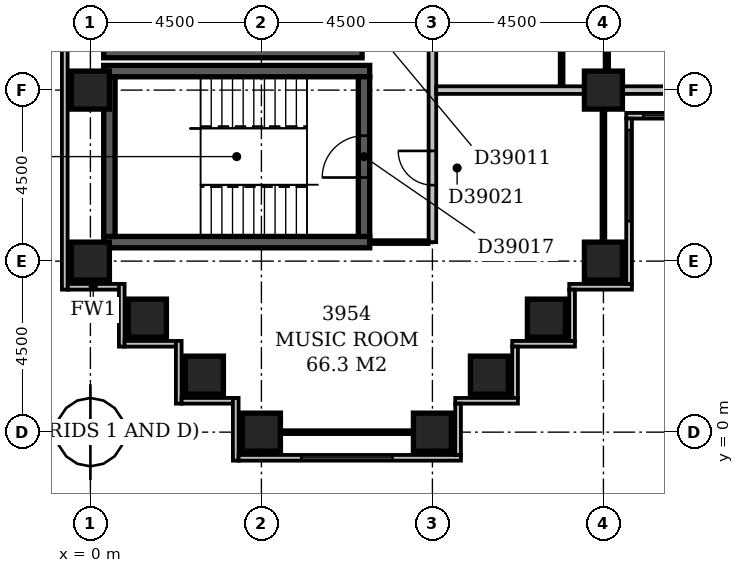
"""IFC4 building model, lengths in metres.
Left out: names, types, materials, properties, quantities, classifications, styles, units other than length and angle.
Written with IfcOpenShell. Run it as: python <this file> out.ifc"""

import sys

from ifc_helpers import new_model, si_unit, direction, frame, frame_2d, origin, origin_2d, place, context, subcontext, project, spatial, rectangle, extrude, element, fill, save


model = new_model("IFC4")
c1 = context("Model", 3, precision=1e-05, world=origin(), true_north=direction((0.0, 1.0)))
c2 = subcontext(c1, "Body", "Model", "MODEL_VIEW")
j1 = project(units=[si_unit("LENGTHUNIT", "METRE"), si_unit("PLANEANGLEUNIT", "RADIAN")], contexts=[c1])
p1 = place(None, origin())
s1 = spatial("IfcSite", under=j1, at=p1, CompositionType="ELEMENT")
p2 = place(p1, origin())
s2 = spatial("IfcBuilding", under=s1, at=p2, CompositionType="ELEMENT")
p3 = place(p2, frame((0.0, 0.0, 155.6)))
s3 = spatial("IfcBuildingStorey", under=s2, at=p3, CompositionType="ELEMENT", Elevation=155.6)
for number, where, z_axis, x_axis in (
    (1, (0.35, 5.0, -0.3), (0.0, 0.0, 1.0), (1.0, 0.0, 0.0)),
    (2, (0.35, 9.5, -0.3), (0.0, 0.0, 1.0), (1.0, 0.0, 0.0)),
):
    element("IfcWall", number, at=place(p3, frame(where, z_axis=z_axis, x_axis=x_axis)), inside=s3, PredefinedType="SHEAR", context=c2, shape_type="SweptSolid", body=[
        extrude(rectangle(XDim=7.0, YDim=0.3, at=frame_2d((3.5, 0.0))), origin(), (0.0, 0.0, 1.0), 3.6),
    ])
p4 = place(p3, frame((0.35, 10.0, -0.3), z_axis=(0.0, 0.0, 1.0), x_axis=(1.0, 0.0, 0.0)))
e3 = element("IfcWall", 3, at=p4, inside=s3, PredefinedType="SHEAR", context=c2, shape_type="SweptSolid", body=[
    extrude(rectangle(XDim=6.8, YDim=0.3, at=frame_2d((3.4, 0.0))), origin(), (0.0, 0.0, 1.0), 3.6),
])
p5 = place(p3, frame((0.5, 5.15, -0.3), z_axis=(0.0, 0.0, 1.0), x_axis=(0.0, 1.0, 0.0)))
e4 = element("IfcWall", 4, at=p5, inside=s3, PredefinedType="SHEAR", context=c2, shape_type="SweptSolid", body=[
    extrude(rectangle(XDim=4.2, YDim=0.3, at=frame_2d((2.1, 0.0))), origin(), (0.0, 0.0, 1.0), 3.6),
])
p6 = place(p3, frame((7.2, 5.15, -0.3), z_axis=(0.0, 0.0, 1.0), x_axis=(0.0, 1.0, 0.0)))
e5 = element("IfcWall", 5, at=p6, inside=s3, PredefinedType="SHEAR", context=c2, shape_type="SweptSolid", body=[
    extrude(rectangle(XDim=4.2, YDim=0.3, at=frame_2d((2.1, 0.0))), origin(), (0.0, 0.0, 1.0), 3.6),
])
p7 = place(p6, frame((1.55, 0.0, 0.3)))
e6 = element("IfcOpeningElement", 6, at=p7, cuts=e5, PredefinedType="OPENING", context=c2, shape_type="SweptSolid", body=[
    extrude(rectangle(XDim=1.1, YDim=2.1, at=frame_2d((0.55, 1.05))), frame((0.0, 0.162, 0.0), z_axis=(0.0, -1.0, 0.0), x_axis=(1.0, 0.0, 0.0)), (0.0, 0.0, 1.0), 0.324),
])
for number, where, z_axis, x_axis in (
    (7, (4.5, 0.0, -0.3), (0.0, 0.0, 1.0), (1.0, 0.0, 0.0)),
    (8, (9.0, 0.0, -0.3), (0.0, 0.0, 1.0), (1.0, 0.0, 0.0)),
    (9, (3.0, 1.5, -0.3), (0.0, 0.0, 1.0), (1.0, 0.0, 0.0)),
    (10, (10.5, 1.5, -0.3), (0.0, 0.0, 1.0), (1.0, 0.0, 0.0)),
    (11, (1.5, 3.0, -0.3), (0.0, 0.0, 1.0), (1.0, 0.0, 0.0)),
    (12, (12.0, 3.0, -0.3), (0.0, 0.0, 1.0), (1.0, 0.0, 0.0)),
    (13, (0.0, 4.5, -0.3), (0.0, 0.0, 1.0), (1.0, 0.0, 0.0)),
    (14, (13.5, 4.5, -0.3), (0.0, 0.0, 1.0), (1.0, 0.0, 0.0)),
    (15, (0.0, 9.0, -0.3), (0.0, 0.0, 1.0), (1.0, 0.0, 0.0)),
    (16, (13.5, 9.0, -0.3), (0.0, 0.0, 1.0), (1.0, 0.0, 0.0)),
):
    element("IfcColumn", number, at=place(p3, frame(where, z_axis=z_axis, x_axis=x_axis)), inside=s3, PredefinedType="COLUMN", context=c2, shape_type="SweptSolid", body=[
        extrude(rectangle(XDim=1.0, YDim=1.0, at=origin_2d()), origin(), (0.0, 0.0, 1.0), 3.6),
    ])
p8 = place(p3, frame((9.675, -0.6, 0.0), z_axis=(0.0, 0.0, 1.0), x_axis=(0.0, 1.0, 0.0)))
e17 = element("IfcWall", 17, at=p8, inside=s3, PredefinedType="STANDARD", context=c2, shape_type="SweptSolid", body=[
    extrude(rectangle(XDim=1.35, YDim=0.15, at=frame_2d((0.675, 0.0))), origin(), (0.0, 0.0, 1.0), 2.7),
])
p9 = place(p3, frame((9.6, 0.825, 0.0), z_axis=(0.0, 0.0, 1.0), x_axis=(1.0, 0.0, 0.0)))
e18 = element("IfcWall", 18, at=p9, inside=s3, PredefinedType="STANDARD", context=c2, shape_type="SweptSolid", body=[
    extrude(rectangle(XDim=1.65, YDim=0.15, at=frame_2d((0.825, 0.0))), origin(), (0.0, 0.0, 1.0), 2.7),
])
p10 = place(p3, frame((11.175, 0.9, 0.0), z_axis=(0.0, 0.0, 1.0), x_axis=(0.0, 1.0, 0.0)))
e19 = element("IfcWall", 19, at=p10, inside=s3, PredefinedType="STANDARD", context=c2, shape_type="SweptSolid", body=[
    extrude(rectangle(XDim=1.35, YDim=0.15, at=frame_2d((0.675, 0.0))), origin(), (0.0, 0.0, 1.0), 2.7),
])
p11 = place(p3, frame((11.1, 2.325, 0.0), z_axis=(0.0, 0.0, 1.0), x_axis=(1.0, 0.0, 0.0)))
e20 = element("IfcWall", 20, at=p11, inside=s3, PredefinedType="STANDARD", context=c2, shape_type="SweptSolid", body=[
    extrude(rectangle(XDim=1.65, YDim=0.15, at=frame_2d((0.825, 0.0))), origin(), (0.0, 0.0, 1.0), 2.7),
])
p12 = place(p3, frame((12.675, 2.4, 0.0), z_axis=(0.0, 0.0, 1.0), x_axis=(0.0, 1.0, 0.0)))
e21 = element("IfcWall", 21, at=p12, inside=s3, PredefinedType="STANDARD", context=c2, shape_type="SweptSolid", body=[
    extrude(rectangle(XDim=1.35, YDim=0.15, at=frame_2d((0.675, 0.0))), origin(), (0.0, 0.0, 1.0), 2.7),
])
p13 = place(p3, frame((12.6, 3.825, 0.0), z_axis=(0.0, 0.0, 1.0), x_axis=(1.0, 0.0, 0.0)))
e22 = element("IfcWall", 22, at=p13, inside=s3, PredefinedType="STANDARD", context=c2, shape_type="SweptSolid", body=[
    extrude(rectangle(XDim=1.65, YDim=0.15, at=frame_2d((0.825, 0.0))), origin(), (0.0, 0.0, 1.0), 2.7),
])
p14 = place(p3, frame((14.175, 3.9, 0.0), z_axis=(0.0, 0.0, 1.0), x_axis=(0.0, 1.0, 0.0)))
e23 = element("IfcWall", 23, at=p14, inside=s3, PredefinedType="STANDARD", context=c2, shape_type="SweptSolid", body=[
    extrude(rectangle(XDim=4.35, YDim=0.15, at=frame_2d((2.175, 0.0))), origin(), (0.0, 0.0, 1.0), 2.7),
])
p15 = place(p14, frame((1.65, 0.0, 0.6)))
e24 = element("IfcOpeningElement", 24, at=p15, cuts=e23, PredefinedType="OPENING", context=c2, shape_type="SweptSolid", body=[
    extrude(rectangle(XDim=2.4, YDim=1.8, at=frame_2d((1.2, 0.9))), frame((0.0, 0.087, 0.0), z_axis=(0.0, -1.0, 0.0), x_axis=(1.0, 0.0, 0.0)), (0.0, 0.0, 1.0), 0.174),
])
p16 = place(p3, frame((14.1, 8.325, 0.0), z_axis=(0.0, 0.0, 1.0), x_axis=(1.0, 0.0, 0.0)))
e25 = element("IfcWall", 25, at=p16, inside=s3, PredefinedType="STANDARD", context=c2, shape_type="SweptSolid", body=[
    extrude(rectangle(XDim=4.65, YDim=0.15, at=frame_2d((2.325, 0.0))), origin(), (0.0, 0.0, 1.0), 2.7),
])
p17 = place(p16, frame((0.45, 0.0, 0.6)))
e26 = element("IfcOpeningElement", 26, at=p17, cuts=e25, PredefinedType="OPENING", context=c2, shape_type="SweptSolid", body=[
    extrude(rectangle(XDim=2.4, YDim=1.8, at=frame_2d((1.2, 0.9))), frame((0.0, 0.087, 0.0), z_axis=(0.0, -1.0, 0.0), x_axis=(1.0, 0.0, 0.0)), (0.0, 0.0, 1.0), 0.174),
])
p18 = place(p3, frame((-0.675, 59.1, 0.0), z_axis=(0.0, 0.0, 1.0), x_axis=(0.0, -1.0, 0.0)))
e27 = element("IfcWall", 27, at=p18, inside=s3, PredefinedType="STANDARD", context=c2, shape_type="SweptSolid", body=[
    extrude(rectangle(XDim=55.35, YDim=0.15, at=frame_2d((27.675, 0.0))), origin(), (0.0, 0.0, 1.0), 2.7),
])
p19 = place(p18, frame((41.854, 0.0, 0.6)))
e28 = element("IfcOpeningElement", 28, at=p19, cuts=e27, PredefinedType="OPENING", context=c2, shape_type="SweptSolid", body=[
    extrude(rectangle(XDim=1.5, YDim=1.8, at=frame_2d((0.75, 0.9))), frame((0.0, 0.087, 0.0), z_axis=(0.0, -1.0, 0.0), x_axis=(1.0, 0.0, 0.0)), (0.0, 0.0, 1.0), 0.174),
])
p20 = place(p3, frame((-0.6, 3.825, 0.0), z_axis=(0.0, 0.0, 1.0), x_axis=(1.0, 0.0, 0.0)))
e29 = element("IfcWall", 29, at=p20, inside=s3, PredefinedType="STANDARD", context=c2, shape_type="SweptSolid", body=[
    extrude(rectangle(XDim=1.35, YDim=0.15, at=frame_2d((0.675, 0.0))), origin(), (0.0, 0.0, 1.0), 2.7),
])
p21 = place(p3, frame((0.825, 3.9, 0.0), z_axis=(0.0, 0.0, 1.0), x_axis=(0.0, -1.0, 0.0)))
e30 = element("IfcWall", 30, at=p21, inside=s3, PredefinedType="STANDARD", context=c2, shape_type="SweptSolid", body=[
    extrude(rectangle(XDim=1.65, YDim=0.15, at=frame_2d((0.825, 0.0))), origin(), (0.0, 0.0, 1.0), 2.7),
])
p22 = place(p3, frame((0.9, 2.325, 0.0), z_axis=(0.0, 0.0, 1.0), x_axis=(1.0, 0.0, 0.0)))
e31 = element("IfcWall", 31, at=p22, inside=s3, PredefinedType="STANDARD", context=c2, shape_type="SweptSolid", body=[
    extrude(rectangle(XDim=1.35, YDim=0.15, at=frame_2d((0.675, 0.0))), origin(), (0.0, 0.0, 1.0), 2.7),
])
p23 = place(p3, frame((2.325, 2.4, 0.0), z_axis=(0.0, 0.0, 1.0), x_axis=(0.0, -1.0, 0.0)))
e32 = element("IfcWall", 32, at=p23, inside=s3, PredefinedType="STANDARD", context=c2, shape_type="SweptSolid", body=[
    extrude(rectangle(XDim=1.65, YDim=0.15, at=frame_2d((0.825, 0.0))), origin(), (0.0, 0.0, 1.0), 2.7),
])
p24 = place(p3, frame((2.4, 0.825, 0.0), z_axis=(0.0, 0.0, 1.0), x_axis=(1.0, 0.0, 0.0)))
e33 = element("IfcWall", 33, at=p24, inside=s3, PredefinedType="STANDARD", context=c2, shape_type="SweptSolid", body=[
    extrude(rectangle(XDim=1.35, YDim=0.15, at=frame_2d((0.675, 0.0))), origin(), (0.0, 0.0, 1.0), 2.7),
])
p25 = place(p3, frame((3.825, 0.9, 0.0), z_axis=(0.0, 0.0, 1.0), x_axis=(0.0, -1.0, 0.0)))
e34 = element("IfcWall", 34, at=p25, inside=s3, PredefinedType="STANDARD", context=c2, shape_type="SweptSolid", body=[
    extrude(rectangle(XDim=1.65, YDim=0.15, at=frame_2d((0.825, 0.0))), origin(), (0.0, 0.0, 1.0), 2.7),
])
p26 = place(p3, frame((3.9, -0.675, 0.0), z_axis=(0.0, 0.0, 1.0), x_axis=(1.0, 0.0, 0.0)))
e35 = element("IfcWall", 35, at=p26, inside=s3, PredefinedType="STANDARD", context=c2, shape_type="SweptSolid", body=[
    extrude(rectangle(XDim=5.85, YDim=0.15, at=frame_2d((2.925, 0.0))), origin(), (0.0, 0.0, 1.0), 2.7),
])
p27 = place(p26, frame((1.65, 0.0, 0.6)))
e36 = element("IfcOpeningElement", 36, at=p27, cuts=e35, PredefinedType="OPENING", context=c2, shape_type="SweptSolid", body=[
    extrude(rectangle(XDim=2.4, YDim=1.8, at=frame_2d((1.2, 0.9))), frame((0.0, 0.087, 0.0), z_axis=(0.0, -1.0, 0.0), x_axis=(1.0, 0.0, 0.0)), (0.0, 0.0, 1.0), 0.174),
])
p28 = place(p3, frame((5.0, 0.0, 0.0), z_axis=(0.0, 0.0, 1.0), x_axis=(1.0, 0.0, 0.0)))
e37 = element("IfcWall", 37, at=p28, inside=s3, PredefinedType="PARTITIONING", context=c2, shape_type="SweptSolid", body=[
    extrude(rectangle(XDim=3.5, YDim=0.1, at=frame_2d((1.75, 0.0))), origin(), (0.0, 0.0, 1.0), 2.7),
])
p29 = place(p3, frame((0.0, 4.5, 0.0), z_axis=(0.0, 0.0, 1.0), x_axis=(0.0, 1.0, 0.0)))
e38 = element("IfcWall", 38, at=p29, inside=s3, PredefinedType="PARTITIONING", context=c2, shape_type="SweptSolid", body=[
    extrude(rectangle(XDim=0.5, YDim=0.1, at=frame_2d((0.25, 0.0))), origin(), (0.0, 0.0, 1.0), 2.7),
])
p30 = place(p3, frame((7.349, 5.0, 0.0), z_axis=(0.0, 0.0, 1.0), x_axis=(1.0, 0.0, 0.0)))
e39 = element("IfcWall", 39, at=p30, inside=s3, PredefinedType="PARTITIONING", context=c2, shape_type="SweptSolid", body=[
    extrude(rectangle(XDim=1.551, YDim=0.1, at=frame_2d((0.775, 0.0))), origin(), (0.0, 0.0, 1.0), 3.3),
])
p31 = place(p3, frame((9.0, 5.0, 0.0), z_axis=(0.0, 0.0, 1.0), x_axis=(0.0, 1.0, 0.0)))
e40 = element("IfcWall", 40, at=p31, inside=s3, PredefinedType="PARTITIONING", context=c2, shape_type="SweptSolid", body=[
    extrude(rectangle(XDim=27.75, YDim=0.2, at=frame_2d((13.875, 0.0))), origin(), (0.0, 0.0, 1.0), 3.3),
])
p32 = place(p31, frame((22.8, 0.0, 0.0)))
e41 = element("IfcOpeningElement", 41, at=p32, cuts=e40, PredefinedType="OPENING", context=c2, shape_type="SweptSolid", body=[
    extrude(rectangle(XDim=1.0, YDim=2.1, at=frame_2d((0.5, 1.05))), frame((0.0, 0.112, 0.0), z_axis=(0.0, -1.0, 0.0), x_axis=(1.0, 0.0, 0.0)), (0.0, 0.0, 1.0), 0.224),
])
p33 = place(p31, frame((14.95, 0.0, 0.0)))
e42 = element("IfcOpeningElement", 42, at=p33, cuts=e40, PredefinedType="OPENING", context=c2, shape_type="SweptSolid", body=[
    extrude(rectangle(XDim=1.0, YDim=2.1, at=frame_2d((0.5, 1.05))), frame((0.0, 0.112, 0.0), z_axis=(0.0, -1.0, 0.0), x_axis=(1.0, 0.0, 0.0)), (0.0, 0.0, 1.0), 0.224),
])
p34 = place(p31, frame((9.3, 0.0, 0.0)))
e43 = element("IfcOpeningElement", 43, at=p34, cuts=e40, PredefinedType="OPENING", context=c2, shape_type="SweptSolid", body=[
    extrude(rectangle(XDim=1.0, YDim=2.1, at=frame_2d((0.5, 1.05))), frame((0.0, 0.112, 0.0), z_axis=(0.0, -1.0, 0.0), x_axis=(1.0, 0.0, 0.0)), (0.0, 0.0, 1.0), 0.224),
])
p35 = place(p31, frame((1.5, 0.0, 0.0)))
e44 = element("IfcOpeningElement", 44, at=p35, cuts=e40, PredefinedType="OPENING", context=c2, shape_type="SweptSolid", body=[
    extrude(rectangle(XDim=0.9, YDim=2.1, at=frame_2d((0.45, 1.05))), frame((0.0, 0.112, 0.0), z_axis=(0.0, -1.0, 0.0), x_axis=(1.0, 0.0, 0.0)), (0.0, 0.0, 1.0), 0.224),
])
p36 = place(p3, frame((13.5, 5.0, 0.0), z_axis=(0.0, 0.0, 1.0), x_axis=(0.0, 1.0, 0.0)))
e45 = element("IfcWall", 45, at=p36, inside=s3, PredefinedType="PARTITIONING", context=c2, shape_type="SweptSolid", body=[
    extrude(rectangle(XDim=3.5, YDim=0.1, at=frame_2d((1.75, 0.0))), origin(), (0.0, 0.0, 1.0), 2.7),
])
p37 = place(p3, frame((9.1, 9.0, 0.0), z_axis=(0.0, 0.0, 1.0), x_axis=(1.0, 0.0, 0.0)))
e46 = element("IfcWall", 46, at=p37, inside=s3, PredefinedType="PARTITIONING", context=c2, shape_type="SweptSolid", body=[
    extrude(rectangle(XDim=3.9, YDim=0.2, at=frame_2d((1.95, 0.0))), origin(), (0.0, 0.0, 1.0), 3.3),
])
p38 = place(p3, frame((14.0, 9.0, 0.0), z_axis=(0.0, 0.0, 1.0), x_axis=(1.0, 0.0, 0.0)))
e47 = element("IfcWall", 47, at=p38, inside=s3, PredefinedType="PARTITIONING", context=c2, shape_type="SweptSolid", body=[
    extrude(rectangle(XDim=3.5, YDim=0.2, at=frame_2d((1.75, 0.0))), origin(), (0.0, 0.0, 1.0), 2.7),
])
p39 = place(p3, frame((12.4, 9.1, 0.0), z_axis=(0.0, 0.0, 1.0), x_axis=(0.0, 1.0, 0.0)))
e48 = element("IfcWall", 48, at=p39, inside=s3, PredefinedType="PARTITIONING", context=c2, shape_type="SweptSolid", body=[
    extrude(rectangle(XDim=4.9, YDim=0.1, at=frame_2d((2.45, 0.0))), origin(), (0.0, 0.0, 1.0), 3.3),
])
p40 = place(p39, frame((1.95, 0.0, 0.0)))
e49 = element("IfcOpeningElement", 49, at=p40, cuts=e48, PredefinedType="OPENING", context=c2, shape_type="SweptSolid", body=[
    extrude(rectangle(XDim=0.9, YDim=2.1, at=frame_2d((0.45, 1.05))), frame((0.0, 0.062, 0.0), z_axis=(0.0, -1.0, 0.0), x_axis=(1.0, 0.0, 0.0)), (0.0, 0.0, 1.0), 0.124),
])
p41 = place(p3, frame((13.6, 9.5, 0.0), z_axis=(0.0, 0.0, 1.0), x_axis=(0.0, 1.0, 0.0)))
e50 = element("IfcWall", 50, at=p41, inside=s3, PredefinedType="PARTITIONING", context=c2, shape_type="SweptSolid", body=[
    extrude(rectangle(XDim=8.4, YDim=0.1, at=frame_2d((4.2, 0.0))), origin(), (0.0, 0.0, 1.0), 3.3),
])
p42 = place(p41, frame((1.3, 0.0, 0.0)))
e51 = element("IfcOpeningElement", 51, at=p42, cuts=e50, PredefinedType="OPENING", context=c2, shape_type="SweptSolid", body=[
    extrude(rectangle(XDim=0.9, YDim=2.1, at=frame_2d((0.45, 1.05))), frame((0.0, 0.062, 0.0), z_axis=(0.0, -1.0, 0.0), x_axis=(1.0, 0.0, 0.0)), (0.0, 0.0, 1.0), 0.124),
])
p43 = place(p41, frame((5.8, 0.0, 0.0)))
e52 = element("IfcOpeningElement", 52, at=p43, cuts=e50, PredefinedType="OPENING", context=c2, shape_type="SweptSolid", body=[
    extrude(rectangle(XDim=0.9, YDim=2.1, at=frame_2d((0.45, 1.05))), frame((0.0, 0.062, 0.0), z_axis=(0.0, -1.0, 0.0), x_axis=(1.0, 0.0, 0.0)), (0.0, 0.0, 1.0), 0.124),
])
p44 = place(p15, origin())
e53 = element("IfcWindow", 53, at=p44, inside=s3, PartitioningType="SINGLE_PANEL", PredefinedType="WINDOW", context=c2, shape_type="SweptSolid", body=[
    extrude(rectangle(XDim=2.4, YDim=1.8, at=frame_2d((1.2, 0.9))), frame((0.0, 0.03, 0.0), z_axis=(0.0, -1.0, 0.0), x_axis=(1.0, 0.0, 0.0)), (0.0, 0.0, 1.0), 0.06),
])
fill(e24, e53)
p45 = place(p17, origin())
e54 = element("IfcWindow", 54, at=p45, inside=s3, PartitioningType="SINGLE_PANEL", PredefinedType="WINDOW", context=c2, shape_type="SweptSolid", body=[
    extrude(rectangle(XDim=2.4, YDim=1.8, at=frame_2d((1.2, 0.9))), frame((0.0, 0.03, 0.0), z_axis=(0.0, -1.0, 0.0), x_axis=(1.0, 0.0, 0.0)), (0.0, 0.0, 1.0), 0.06),
])
fill(e26, e54)
p46 = place(p27, origin())
e55 = element("IfcWindow", 55, at=p46, inside=s3, PartitioningType="SINGLE_PANEL", PredefinedType="WINDOW", context=c2, shape_type="SweptSolid", body=[
    extrude(rectangle(XDim=2.4, YDim=1.8, at=frame_2d((1.2, 0.9))), frame((0.0, 0.03, 0.0), z_axis=(0.0, -1.0, 0.0), x_axis=(1.0, 0.0, 0.0)), (0.0, 0.0, 1.0), 0.06),
])
fill(e36, e55)
p47 = place(p7, origin())
e56 = element("IfcDoor", 56, at=p47, inside=s3, OperationType="SINGLE_SWING_LEFT", PredefinedType="DOOR", context=c2, shape_type="SweptSolid", body=[
    extrude(rectangle(XDim=1.1, YDim=2.1, at=frame_2d((0.55, 1.05))), frame((0.0, 0.025, 0.0), z_axis=(0.0, -1.0, 0.0), x_axis=(1.0, 0.0, 0.0)), (0.0, 0.0, 1.0), 0.05),
])
fill(e6, e56)
p48 = place(p35, frame((0.9, 0.0, 0.0), z_axis=(0.0, 0.0, 1.0), x_axis=(-1.0, 0.0, 0.0)))
e57 = element("IfcDoor", 57, at=p48, inside=s3, OperationType="SINGLE_SWING_LEFT", PredefinedType="DOOR", context=c2, shape_type="SweptSolid", body=[
    extrude(rectangle(XDim=0.9, YDim=2.1, at=frame_2d((0.45, 1.05))), frame((0.0, 0.025, 0.0), z_axis=(0.0, -1.0, 0.0), x_axis=(1.0, 0.0, 0.0)), (0.0, 0.0, 1.0), 0.05),
])
fill(e44, e57)
save(model, sys.argv[1])
